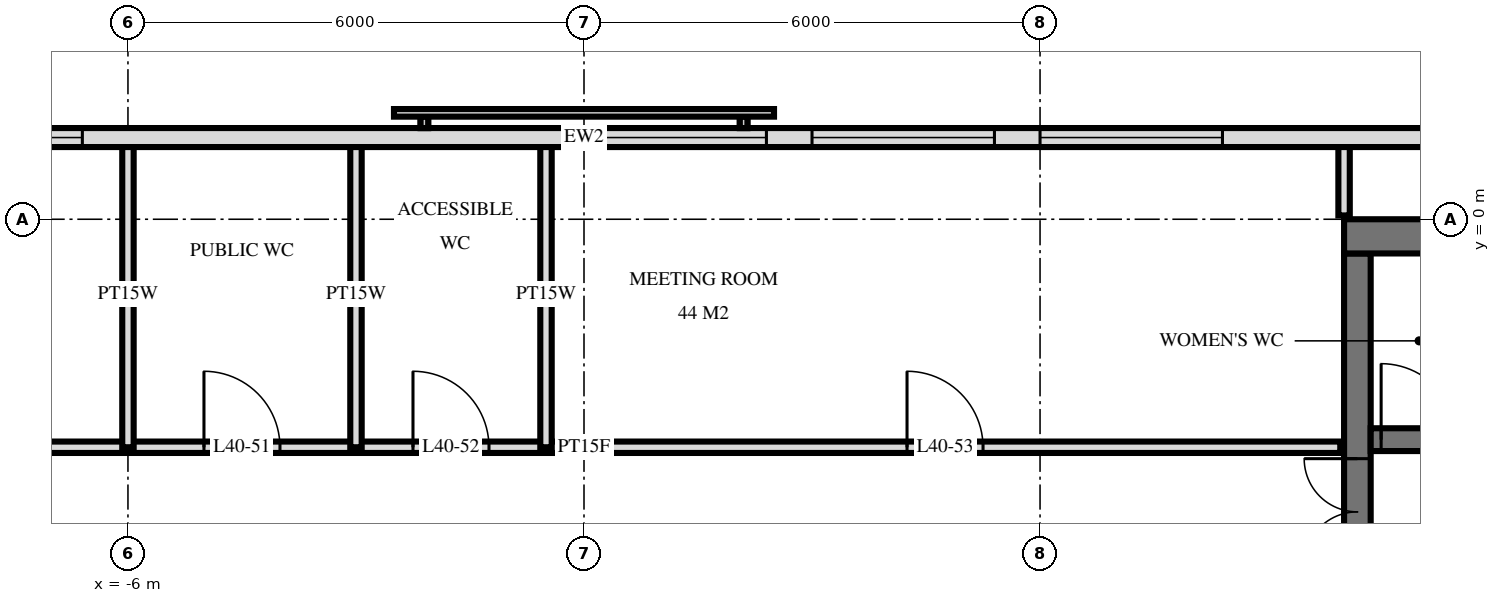
"""IFC4 building model, lengths in metres.
Left out: names, types, materials, properties, quantities, classifications, styles, units other than length and angle.
Written with IfcOpenShell. Run it as: python <this file> out.ifc"""

import sys

from ifc_helpers import new_model, si_unit, direction, frame, frame_2d, origin, place, context, subcontext, project, spatial, rectangle, extrude, element, fill, save


model = new_model("IFC4")
c1 = context("Model", 3, precision=1e-05, world=origin(), true_north=direction((0.0, 1.0)))
c2 = subcontext(c1, "Body", "Model", "MODEL_VIEW")
j1 = project(units=[si_unit("LENGTHUNIT", "METRE"), si_unit("PLANEANGLEUNIT", "RADIAN")], contexts=[c1])
p1 = place(None, origin())
s1 = spatial("IfcSite", under=j1, at=p1, CompositionType="ELEMENT")
p2 = place(p1, origin())
s2 = spatial("IfcBuilding", under=s1, at=p2, CompositionType="ELEMENT")
p3 = place(p2, frame((0.0, 0.0, 156.0)))
s3 = spatial("IfcBuildingStorey", under=s2, at=p3, CompositionType="ELEMENT", Elevation=156.0)
p4 = place(p3, frame((10.0, -0.225, 0.0), z_axis=(0.0, 0.0, 1.0), x_axis=(1.0, 0.0, 0.0)))
e1 = element("IfcWall", 1, at=p4, inside=s3, PredefinedType="SHEAR", context=c2, shape_type="SweptSolid", body=[
    extrude(rectangle(XDim=14.5, YDim=0.45, at=frame_2d((7.25, 0.0))), origin(), (0.0, 0.0, 1.0), 3.6),
])
p5 = place(p3, frame((10.175, -14.55, 0.0), z_axis=(0.0, 0.0, 1.0), x_axis=(0.0, 1.0, 0.0)))
e2 = element("IfcWall", 2, at=p5, inside=s3, PredefinedType="SHEAR", context=c2, shape_type="SweptSolid", body=[
    extrude(rectangle(XDim=14.1, YDim=0.35, at=frame_2d((7.05, 0.0))), origin(), (0.0, 0.0, 1.0), 3.6),
])
p6 = place(p5, frame((8.4, 0.0, 0.0)))
e3 = element("IfcOpeningElement", 3, at=p6, cuts=e2, PredefinedType="OPENING", context=c2, shape_type="SweptSolid", body=[
    extrude(rectangle(XDim=1.4, YDim=2.4, at=frame_2d((0.7, 1.2))), frame((0.0, 0.185, 0.0), z_axis=(0.0, -1.0, 0.0), x_axis=(1.0, 0.0, 0.0)), (0.0, 0.0, 1.0), 0.37),
])
p7 = place(p5, frame((10.0, 0.0, 0.0)))
e4 = element("IfcOpeningElement", 4, at=p7, cuts=e2, PredefinedType="OPENING", context=c2, shape_type="SweptSolid", body=[
    extrude(rectangle(XDim=1.4, YDim=2.4, at=frame_2d((0.7, 1.2))), frame((0.0, 0.185, 0.0), z_axis=(0.0, -1.0, 0.0), x_axis=(1.0, 0.0, 0.0)), (0.0, 0.0, 1.0), 0.37),
])
p8 = place(p5, frame((4.0, 0.0, 0.0)))
e5 = element("IfcOpeningElement", 5, at=p8, cuts=e2, PredefinedType="OPENING", context=c2, shape_type="SweptSolid", body=[
    extrude(rectangle(XDim=1.2, YDim=2.1, at=frame_2d((0.6, 1.05))), frame((0.0, 0.185, 0.0), z_axis=(0.0, -1.0, 0.0), x_axis=(1.0, 0.0, 0.0)), (0.0, 0.0, 1.0), 0.37),
])
p9 = place(p3, frame((10.35, -2.9, 0.0), z_axis=(0.0, 0.0, 1.0), x_axis=(1.0, 0.0, 0.0)))
e6 = element("IfcWall", 6, at=p9, inside=s3, PredefinedType="SHEAR", context=c2, shape_type="SweptSolid", body=[
    extrude(rectangle(XDim=13.7, YDim=0.3, at=frame_2d((6.85, 0.0))), origin(), (0.0, 0.0, 1.0), 3.6),
])
p10 = place(p9, frame((12.05, 0.0, 0.0)))
e7 = element("IfcOpeningElement", 7, at=p10, cuts=e6, PredefinedType="OPENING", context=c2, shape_type="SweptSolid", body=[
    extrude(rectangle(XDim=1.1, YDim=2.1, at=frame_2d((0.55, 1.05))), frame((0.0, 0.16, 0.0), z_axis=(0.0, -1.0, 0.0), x_axis=(1.0, 0.0, 0.0)), (0.0, 0.0, 1.0), 0.32),
])
p11 = place(p9, frame((6.188, 0.0, 0.0)))
e8 = element("IfcOpeningElement", 8, at=p11, cuts=e6, PredefinedType="OPENING", context=c2, shape_type="SweptSolid", body=[
    extrude(rectangle(XDim=0.9, YDim=2.1, at=frame_2d((0.45, 1.05))), frame((0.0, 0.16, 0.0), z_axis=(0.0, -1.0, 0.0), x_axis=(1.0, 0.0, 0.0)), (0.0, 0.0, 1.0), 0.32),
])
p12 = place(p9, frame((7.613, 0.0, 0.0)))
e9 = element("IfcOpeningElement", 9, at=p12, cuts=e6, PredefinedType="OPENING", context=c2, shape_type="SweptSolid", body=[
    extrude(rectangle(XDim=0.9, YDim=2.1, at=frame_2d((0.45, 1.05))), frame((0.0, 0.16, 0.0), z_axis=(0.0, -1.0, 0.0), x_axis=(1.0, 0.0, 0.0)), (0.0, 0.0, 1.0), 0.32),
])
p13 = place(p9, frame((0.137, 0.0, 0.0)))
e10 = element("IfcOpeningElement", 10, at=p13, cuts=e6, PredefinedType="OPENING", context=c2, shape_type="SweptSolid", body=[
    extrude(rectangle(XDim=1.0, YDim=2.1, at=frame_2d((0.5, 1.05))), frame((0.0, 0.16, 0.0), z_axis=(0.0, -1.0, 0.0), x_axis=(1.0, 0.0, 0.0)), (0.0, 0.0, 1.0), 0.32),
])
p14 = place(p9, frame((1.562, 0.0, 0.0)))
e11 = element("IfcOpeningElement", 11, at=p14, cuts=e6, PredefinedType="OPENING", context=c2, shape_type="SweptSolid", body=[
    extrude(rectangle(XDim=1.0, YDim=2.1, at=frame_2d((0.5, 1.05))), frame((0.0, 0.16, 0.0), z_axis=(0.0, -1.0, 0.0), x_axis=(1.0, 0.0, 0.0)), (0.0, 0.0, 1.0), 0.32),
])
p15 = place(p9, frame((3.85, 0.0, 0.0)))
e12 = element("IfcOpeningElement", 12, at=p15, cuts=e6, PredefinedType="OPENING", context=c2, shape_type="SweptSolid", body=[
    extrude(rectangle(XDim=1.0, YDim=2.1, at=frame_2d((0.5, 1.05))), frame((0.0, 0.16, 0.0), z_axis=(0.0, -1.0, 0.0), x_axis=(1.0, 0.0, 0.0)), (0.0, 0.0, 1.0), 0.32),
])
p16 = place(p9, frame((9.7, 0.0, 0.0)))
e13 = element("IfcOpeningElement", 13, at=p16, cuts=e6, PredefinedType="OPENING", context=c2, shape_type="SweptSolid", body=[
    extrude(rectangle(XDim=1.0, YDim=2.1, at=frame_2d((0.5, 1.05))), frame((0.0, 0.16, 0.0), z_axis=(0.0, -1.0, 0.0), x_axis=(1.0, 0.0, 0.0)), (0.0, 0.0, 1.0), 0.32),
])
p17 = place(p3, frame((23.675, 1.075, 0.0), z_axis=(0.0, 0.0, 1.0), x_axis=(-1.0, 0.0, 0.0)))
e14 = element("IfcWall", 14, at=p17, inside=s3, PredefinedType="SOLIDWALL", context=c2, shape_type="SweptSolid", body=[
    extrude(rectangle(XDim=47.351, YDim=0.25, at=frame_2d((23.675, 0.0))), origin(), (0.0, 0.0, 1.0), 3.32),
])
p18 = place(p17, frame((15.275, 0.0, 0.3)))
e15 = element("IfcOpeningElement", 15, at=p18, cuts=e14, PredefinedType="OPENING", context=c2, shape_type="SweptSolid", body=[
    extrude(rectangle(XDim=2.4, YDim=2.1, at=frame_2d((1.2, 1.05))), frame((0.0, 0.135, 0.0), z_axis=(0.0, -1.0, 0.0), x_axis=(1.0, 0.0, 0.0)), (0.0, 0.0, 1.0), 0.27),
])
p19 = place(p17, frame((18.275, 0.0, 0.3)))
e16 = element("IfcOpeningElement", 16, at=p19, cuts=e14, PredefinedType="OPENING", context=c2, shape_type="SweptSolid", body=[
    extrude(rectangle(XDim=2.4, YDim=2.1, at=frame_2d((1.2, 1.05))), frame((0.0, 0.135, 0.0), z_axis=(0.0, -1.0, 0.0), x_axis=(1.0, 0.0, 0.0)), (0.0, 0.0, 1.0), 0.27),
])
p20 = place(p17, frame((21.275, 0.0, 0.3)))
e17 = element("IfcOpeningElement", 17, at=p20, cuts=e14, PredefinedType="OPENING", context=c2, shape_type="SweptSolid", body=[
    extrude(rectangle(XDim=2.4, YDim=2.1, at=frame_2d((1.2, 1.05))), frame((0.0, 0.135, 0.0), z_axis=(0.0, -1.0, 0.0), x_axis=(1.0, 0.0, 0.0)), (0.0, 0.0, 1.0), 0.27),
])
p21 = place(p17, frame((30.275, 0.0, 0.3)))
e18 = element("IfcOpeningElement", 18, at=p21, cuts=e14, PredefinedType="OPENING", context=c2, shape_type="SweptSolid", body=[
    extrude(rectangle(XDim=2.4, YDim=2.1, at=frame_2d((1.2, 1.05))), frame((0.0, 0.135, 0.0), z_axis=(0.0, -1.0, 0.0), x_axis=(1.0, 0.0, 0.0)), (0.0, 0.0, 1.0), 0.27),
])
p22 = place(p3, frame((10.0, 0.05, 0.0), z_axis=(0.0, 0.0, 1.0), x_axis=(0.0, 1.0, 0.0)))
e19 = element("IfcWall", 19, at=p22, inside=s3, PredefinedType="PARTITIONING", context=c2, shape_type="SweptSolid", body=[
    extrude(rectangle(XDim=0.97, YDim=0.15, at=frame_2d((0.485, 0.0))), origin(), (0.0, 0.0, 1.0), 3.32),
])
for number, where, z_axis, x_axis in (
    (20, (-0.5, -3.0, 0.0), (0.0, 0.0, 1.0), (0.0, 1.0, 0.0)),
    (21, (-3.0, -3.0, 0.0), (0.0, 0.0, 1.0), (0.0, 1.0, 0.0)),
    (22, (-6.0, -3.0, 0.0), (0.0, 0.0, 1.0), (0.0, 1.0, 0.0)),
):
    element("IfcWall", number, at=place(p3, frame(where, z_axis=z_axis, x_axis=x_axis)), inside=s3, PredefinedType="PLUMBINGWALL", context=c2, shape_type="SweptSolid", body=[
        extrude(rectangle(XDim=4.02, YDim=0.15, at=frame_2d((2.01, 0.0))), origin(), (0.0, 0.0, 1.0), 3.32),
    ])
p23 = place(p3, frame((-9.95, -3.0, 0.0), z_axis=(0.0, 0.0, 1.0), x_axis=(1.0, 0.0, 0.0)))
e23 = element("IfcWall", 23, at=p23, inside=s3, PredefinedType="PARTITIONING", context=c2, shape_type="SweptSolid", body=[
    extrude(rectangle(XDim=19.9, YDim=0.15, at=frame_2d((9.95, 0.0))), origin(), (0.0, 0.0, 1.0), 3.32),
])
p24 = place(p23, frame((1.45, 0.0, 0.0)))
e24 = element("IfcOpeningElement", 24, at=p24, cuts=e23, PredefinedType="OPENING", context=c2, shape_type="SweptSolid", body=[
    extrude(rectangle(XDim=1.0, YDim=2.1, at=frame_2d((0.5, 1.05))), frame((0.0, 0.085, 0.0), z_axis=(0.0, -1.0, 0.0), x_axis=(1.0, 0.0, 0.0)), (0.0, 0.0, 1.0), 0.17),
])
p25 = place(p23, frame((4.95, 0.0, 0.0)))
e25 = element("IfcOpeningElement", 25, at=p25, cuts=e23, PredefinedType="OPENING", context=c2, shape_type="SweptSolid", body=[
    extrude(rectangle(XDim=1.0, YDim=2.1, at=frame_2d((0.5, 1.05))), frame((0.0, 0.085, 0.0), z_axis=(0.0, -1.0, 0.0), x_axis=(1.0, 0.0, 0.0)), (0.0, 0.0, 1.0), 0.17),
])
p26 = place(p23, frame((7.7, 0.0, 0.0)))
e26 = element("IfcOpeningElement", 26, at=p26, cuts=e23, PredefinedType="OPENING", context=c2, shape_type="SweptSolid", body=[
    extrude(rectangle(XDim=1.0, YDim=2.1, at=frame_2d((0.5, 1.05))), frame((0.0, 0.085, 0.0), z_axis=(0.0, -1.0, 0.0), x_axis=(1.0, 0.0, 0.0)), (0.0, 0.0, 1.0), 0.17),
])
p27 = place(p23, frame((14.2, 0.0, 0.0)))
e27 = element("IfcOpeningElement", 27, at=p27, cuts=e23, PredefinedType="OPENING", context=c2, shape_type="SweptSolid", body=[
    extrude(rectangle(XDim=1.0, YDim=2.1, at=frame_2d((0.5, 1.05))), frame((0.0, 0.085, 0.0), z_axis=(0.0, -1.0, 0.0), x_axis=(1.0, 0.0, 0.0)), (0.0, 0.0, 1.0), 0.17),
])
p28 = place(p18, origin())
e28 = element("IfcWindow", 28, at=p28, inside=s3, PartitioningType="SINGLE_PANEL", PredefinedType="WINDOW", context=c2, shape_type="SweptSolid", body=[
    extrude(rectangle(XDim=2.4, YDim=2.1, at=frame_2d((1.2, 1.05))), frame((0.0, 0.03, 0.0), z_axis=(0.0, -1.0, 0.0), x_axis=(1.0, 0.0, 0.0)), (0.0, 0.0, 1.0), 0.06),
])
fill(e15, e28)
p29 = place(p19, origin())
e29 = element("IfcWindow", 29, at=p29, inside=s3, PartitioningType="SINGLE_PANEL", PredefinedType="WINDOW", context=c2, shape_type="SweptSolid", body=[
    extrude(rectangle(XDim=2.4, YDim=2.1, at=frame_2d((1.2, 1.05))), frame((0.0, 0.03, 0.0), z_axis=(0.0, -1.0, 0.0), x_axis=(1.0, 0.0, 0.0)), (0.0, 0.0, 1.0), 0.06),
])
fill(e16, e29)
p30 = place(p20, origin())
e30 = element("IfcWindow", 30, at=p30, inside=s3, PartitioningType="SINGLE_PANEL", PredefinedType="WINDOW", context=c2, shape_type="SweptSolid", body=[
    extrude(rectangle(XDim=2.4, YDim=2.1, at=frame_2d((1.2, 1.05))), frame((0.0, 0.03, 0.0), z_axis=(0.0, -1.0, 0.0), x_axis=(1.0, 0.0, 0.0)), (0.0, 0.0, 1.0), 0.06),
])
fill(e17, e30)
p31 = place(p21, origin())
e31 = element("IfcWindow", 31, at=p31, inside=s3, PartitioningType="SINGLE_PANEL", PredefinedType="WINDOW", context=c2, shape_type="SweptSolid", body=[
    extrude(rectangle(XDim=2.4, YDim=2.1, at=frame_2d((1.2, 1.05))), frame((0.0, 0.03, 0.0), z_axis=(0.0, -1.0, 0.0), x_axis=(1.0, 0.0, 0.0)), (0.0, 0.0, 1.0), 0.06),
])
fill(e18, e31)
p32 = place(p7, origin())
e32 = element("IfcDoor", 32, at=p32, inside=s3, OperationType="DOUBLE_DOOR_SINGLE_SWING", PredefinedType="DOOR", context=c2, shape_type="SweptSolid", body=[
    extrude(rectangle(XDim=1.4, YDim=2.4, at=frame_2d((0.7, 1.2))), frame((0.0, 0.025, 0.0), z_axis=(0.0, -1.0, 0.0), x_axis=(1.0, 0.0, 0.0)), (0.0, 0.0, 1.0), 0.05),
])
fill(e4, e32)
p33 = place(p13, origin())
e33 = element("IfcDoor", 33, at=p33, inside=s3, OperationType="SINGLE_SWING_RIGHT", PredefinedType="DOOR", context=c2, shape_type="SweptSolid", body=[
    extrude(rectangle(XDim=1.0, YDim=2.1, at=frame_2d((0.5, 1.05))), frame((0.0, 0.025, 0.0), z_axis=(0.0, -1.0, 0.0), x_axis=(1.0, 0.0, 0.0)), (0.0, 0.0, 1.0), 0.05),
])
fill(e10, e33)
p34 = place(p25, origin())
e34 = element("IfcDoor", 34, at=p34, inside=s3, OperationType="SINGLE_SWING_RIGHT", PredefinedType="DOOR", context=c2, shape_type="SweptSolid", body=[
    extrude(rectangle(XDim=1.0, YDim=2.1, at=frame_2d((0.5, 1.05))), frame((0.0, 0.025, 0.0), z_axis=(0.0, -1.0, 0.0), x_axis=(1.0, 0.0, 0.0)), (0.0, 0.0, 1.0), 0.05),
])
fill(e25, e34)
p35 = place(p26, origin())
e35 = element("IfcDoor", 35, at=p35, inside=s3, OperationType="SINGLE_SWING_RIGHT", PredefinedType="DOOR", context=c2, shape_type="SweptSolid", body=[
    extrude(rectangle(XDim=1.0, YDim=2.1, at=frame_2d((0.5, 1.05))), frame((0.0, 0.025, 0.0), z_axis=(0.0, -1.0, 0.0), x_axis=(1.0, 0.0, 0.0)), (0.0, 0.0, 1.0), 0.05),
])
fill(e26, e35)
p36 = place(p27, origin())
e36 = element("IfcDoor", 36, at=p36, inside=s3, OperationType="SINGLE_SWING_RIGHT", PredefinedType="DOOR", context=c2, shape_type="SweptSolid", body=[
    extrude(rectangle(XDim=1.0, YDim=2.1, at=frame_2d((0.5, 1.05))), frame((0.0, 0.025, 0.0), z_axis=(0.0, -1.0, 0.0), x_axis=(1.0, 0.0, 0.0)), (0.0, 0.0, 1.0), 0.05),
])
fill(e27, e36)
save(model, sys.argv[1])
